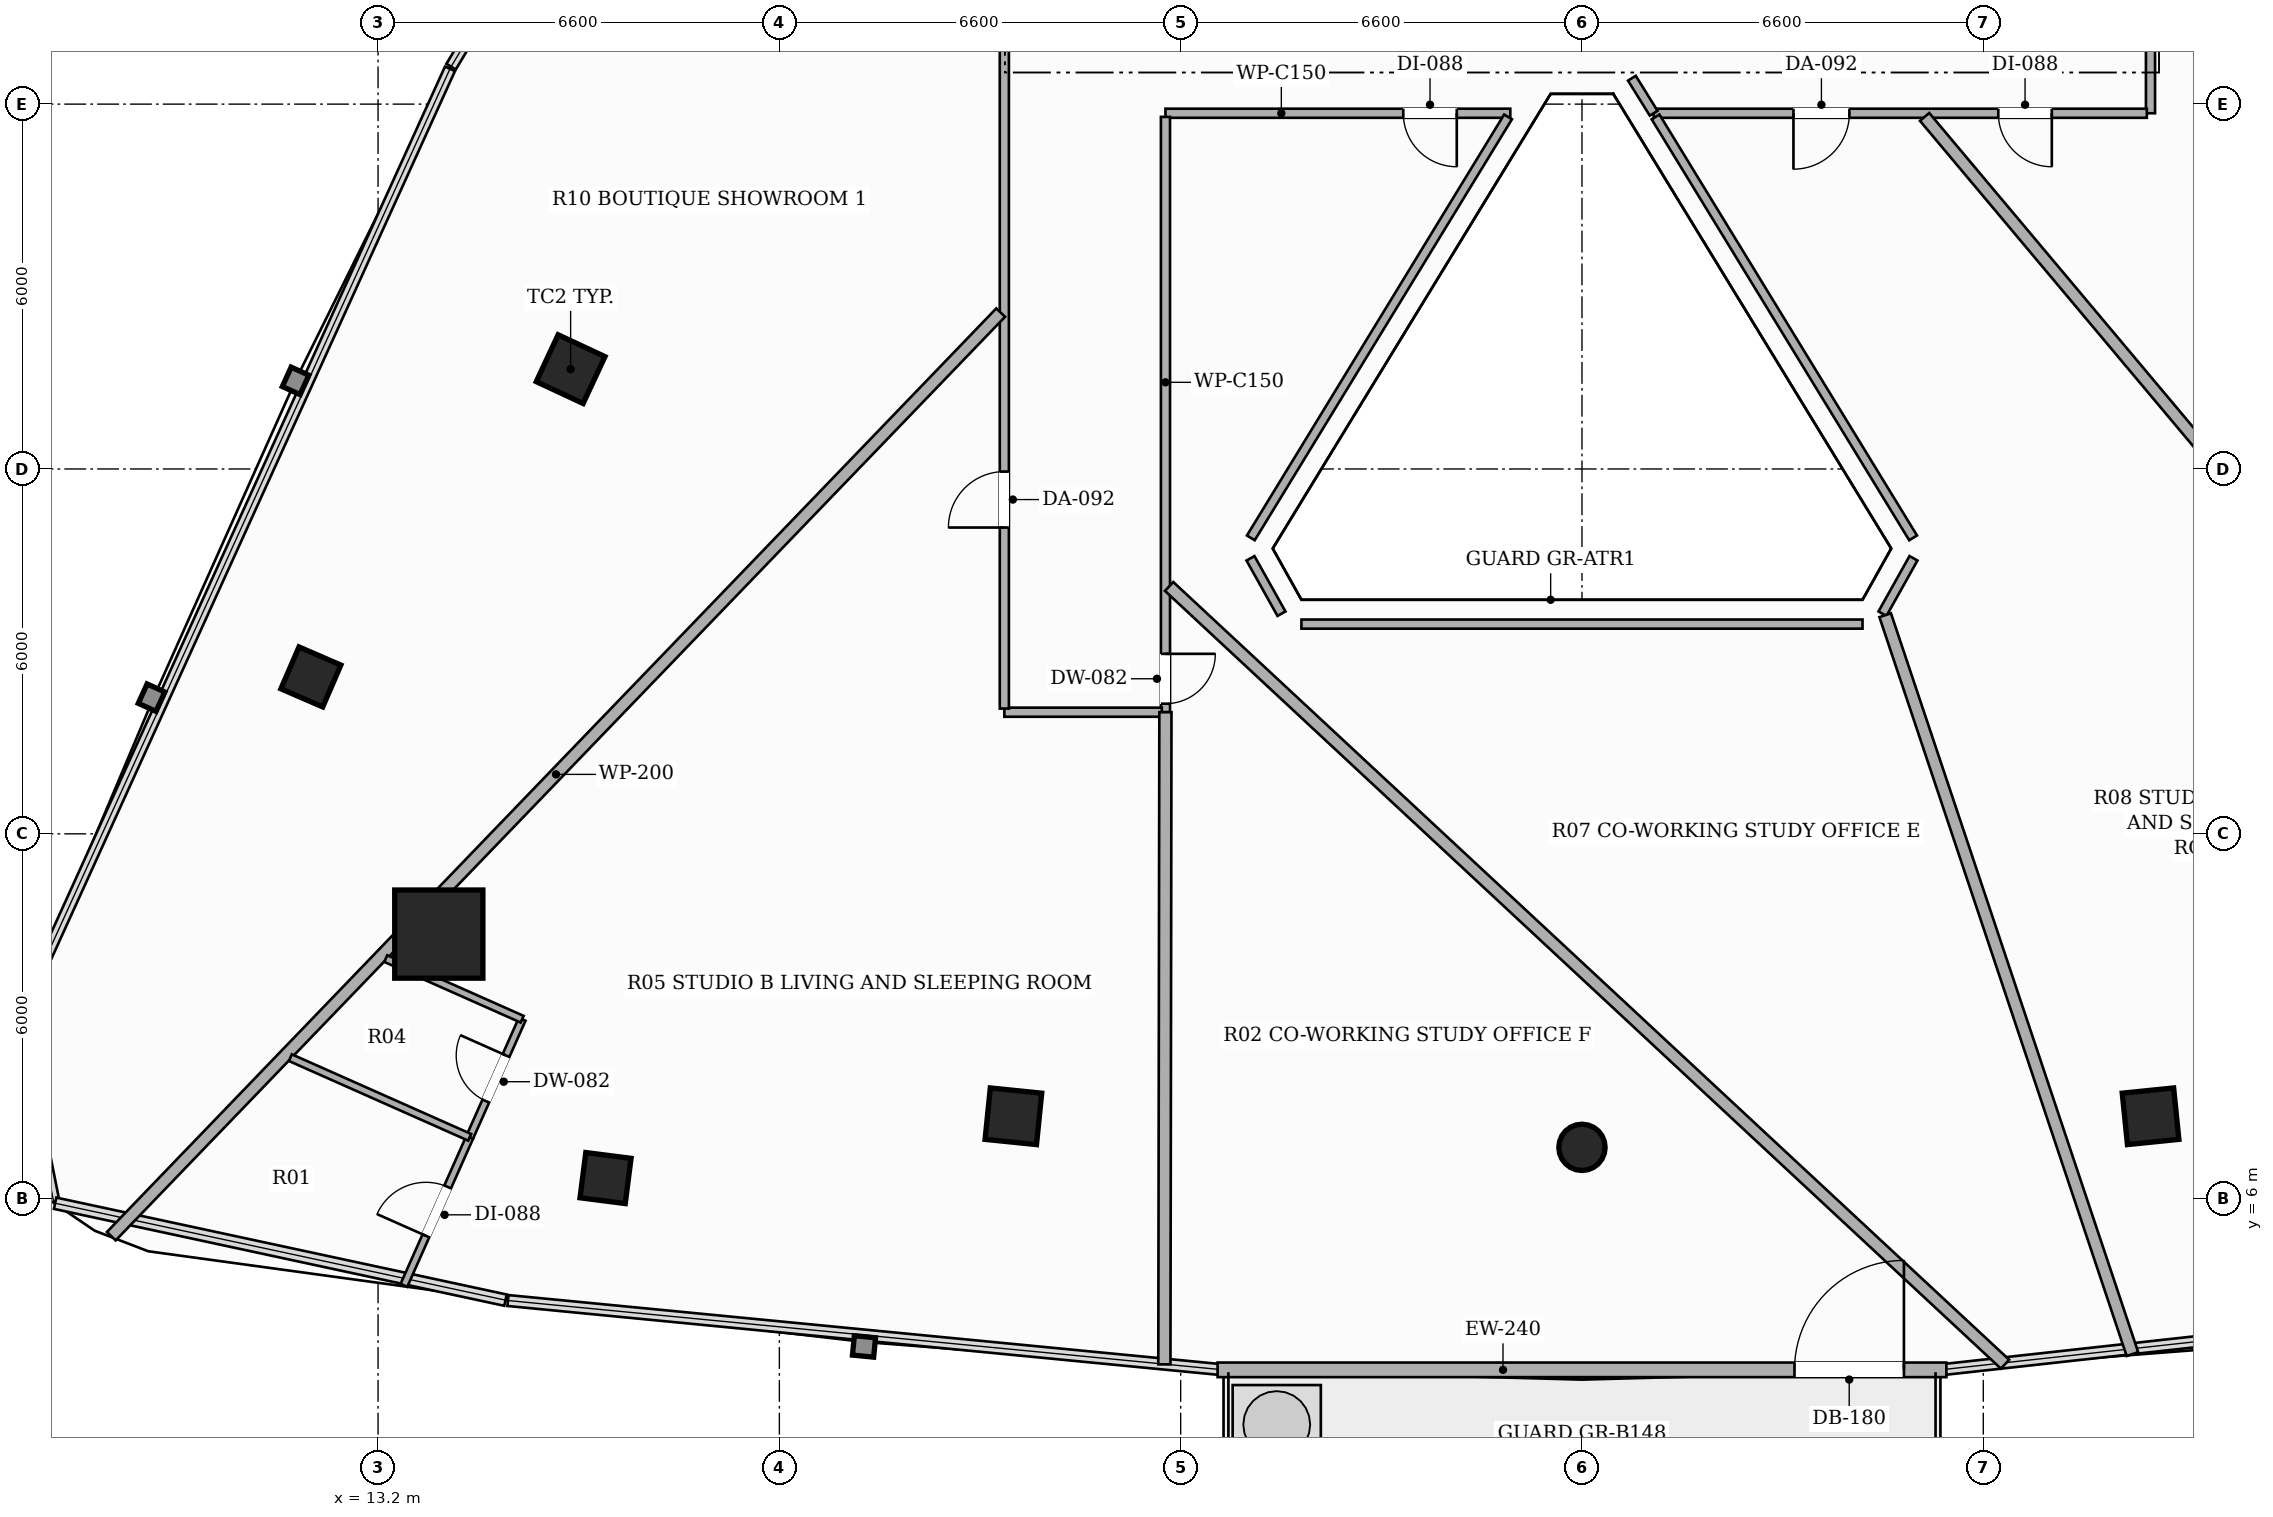
"""IFC4 building model, lengths in metres.
Left out: names, types, materials, properties, quantities, classifications, styles, units other than length and angle.
Written with IfcOpenShell. Run it as: python <this file> out.ifc"""

import sys

from ifc_helpers import new_model, si_unit, direction, frame, frame_2d, origin, origin_2d, place, context, subcontext, project, spatial, rectangle, hollow_rectangle, hollow_circle, extrude, element, fill, save


model = new_model("IFC4")
c1 = context("Model", 3, precision=1e-05, world=origin(), true_north=direction((0.0, 1.0)))
c2 = subcontext(c1, "Body", "Model", "MODEL_VIEW")
j1 = project(units=[si_unit("LENGTHUNIT", "METRE"), si_unit("PLANEANGLEUNIT", "RADIAN")], contexts=[c1])
p1 = place(None, origin())
s1 = spatial("IfcSite", under=j1, at=p1, CompositionType="ELEMENT")
p2 = place(p1, origin())
s2 = spatial("IfcBuilding", under=s1, at=p2, CompositionType="ELEMENT")
p3 = place(p2, frame((0.0, 0.0, 133.1)))
s3 = spatial("IfcBuildingStorey", under=s2, at=p3, CompositionType="ELEMENT", Elevation=133.1)
p4 = place(p3, frame((14.199, 10.351, 0.0), z_axis=(0.0, 0.0, 1.0), x_axis=(1.0, 0.0, 0.0)))
e1 = element("IfcColumn", 1, at=p4, inside=s3, PredefinedType="COLUMN", context=c2, shape_type="SweptSolid", body=[
    extrude(hollow_rectangle(XDim=1.45, YDim=1.45, WallThickness=0.045, at=origin_2d()), origin(), (0.0, 0.0, 1.0), 3.3),
])
for number, where, z_axis, x_axis in (
    (2, (16.367, 19.642, 0.0), (0.0, 0.0, 1.0), (0.423, 0.906, 0.0)),
    (3, (23.649, 7.355, 0.0), (0.0, 0.0, 1.0), (-0.995, 0.101, 0.0)),
):
    element("IfcColumn", number, at=place(p3, frame(where, z_axis=z_axis, x_axis=x_axis)), inside=s3, PredefinedType="COLUMN", context=c2, shape_type="SweptSolid", body=[
        extrude(hollow_rectangle(XDim=0.85, YDim=0.85, WallThickness=0.028, at=origin_2d()), origin(), (0.0, 0.0, 1.0), 3.3),
    ])
p5 = place(p3, frame((33.0, 6.844, 0.0), z_axis=(0.0, 0.0, 1.0), x_axis=(1.0, 0.0, 0.0)))
e4 = element("IfcColumn", 4, at=p5, inside=s3, PredefinedType="COLUMN", context=c2, shape_type="SweptSolid", body=[
    extrude(hollow_circle(Radius=0.381, WallThickness=0.022, at=origin_2d()), origin(), (0.0, 0.0, 1.0), 3.3),
])
p6 = place(p3, frame((42.351, 7.355, 0.0), z_axis=(0.0, 0.0, 1.0), x_axis=(0.994880708829, 0.101056297183, 0.0)))
e5 = element("IfcColumn", 5, at=p6, inside=s3, PredefinedType="COLUMN", context=c2, shape_type="SweptSolid", body=[
    extrude(hollow_rectangle(XDim=0.85, YDim=0.85, WallThickness=0.028, at=origin_2d()), origin(), (0.0, 0.0, 1.0), 3.3),
])
for number, where, z_axis, x_axis in (
    (6, (12.095, 14.58, 0.0), (0.0, 0.0, 1.0), (0.397, 0.918, 0.0)),
    (7, (16.941, 6.339, 0.0), (0.0, 0.0, 1.0), (-0.992, 0.127, 0.0)),
):
    element("IfcColumn", number, at=place(p3, frame(where, z_axis=z_axis, x_axis=x_axis)), inside=s3, PredefinedType="COLUMN", context=c2, shape_type="SweptSolid", body=[
        extrude(hollow_rectangle(XDim=0.75, YDim=0.75, WallThickness=0.025, at=origin_2d()), origin(), (0.0, 0.0, 1.0), 3.3),
    ])
p7 = place(p3, frame((27.007, 3.185, 0.0), z_axis=(0.0, 0.0, 1.0), x_axis=(1.0, 0.0, 0.0)))
e8 = element("IfcWall", 8, at=p7, inside=s3, PredefinedType="SOLIDWALL", context=c2, shape_type="SweptSolid", body=[
    extrude(rectangle(XDim=11.986, YDim=0.24, at=frame_2d((5.993, 0.0))), origin(), (0.0, 0.0, 1.0), 2.624),
])
p8 = place(p7, frame((9.488, 0.0, 0.0)))
e9 = element("IfcOpeningElement", 9, at=p8, cuts=e8, PredefinedType="OPENING", context=c2, shape_type="SweptSolid", body=[
    extrude(rectangle(XDim=1.8, YDim=2.2, at=frame_2d((0.9, 1.1))), frame((0.0, 0.13, 0.0), z_axis=(0.0, -1.0, 0.0), x_axis=(1.0, 0.0, 0.0)), (0.0, 0.0, 1.0), 0.26),
])
p9 = place(p3, frame((31.821, 23.85, 0.0), z_axis=(0.0, 0.0, 1.0), x_axis=(-1.0, 0.0, 0.0)))
e10 = element("IfcWall", 10, at=p9, inside=s3, PredefinedType="PARTITIONING", context=c2, shape_type="SweptSolid", body=[
    extrude(rectangle(XDim=5.671, YDim=0.15, at=frame_2d((2.835, 0.0))), origin(), (0.0, 0.0, 1.0), 2.721),
])
p10 = place(p9, frame((0.88, 0.0, 0.0)))
e11 = element("IfcOpeningElement", 11, at=p10, cuts=e10, PredefinedType="OPENING", context=c2, shape_type="SweptSolid", body=[
    extrude(rectangle(XDim=0.88, YDim=2.1, at=frame_2d((0.44, 1.05))), frame((0.0, 0.085, 0.0), z_axis=(0.0, -1.0, 0.0), x_axis=(1.0, 0.0, 0.0)), (0.0, 0.0, 1.0), 0.17),
])
p11 = place(p3, frame((26.15, 23.79, 0.0), z_axis=(0.0, 0.0, 1.0), x_axis=(0.0, -1.0, 0.0)))
e12 = element("IfcWall", 12, at=p11, inside=s3, PredefinedType="PARTITIONING", context=c2, shape_type="SweptSolid", body=[
    extrude(rectangle(XDim=9.79, YDim=0.15, at=frame_2d((4.895, 0.0))), origin(), (0.0, 0.0, 1.0), 2.721),
])
p12 = place(p11, frame((8.83, 0.0, 0.0)))
e13 = element("IfcOpeningElement", 13, at=p12, cuts=e12, PredefinedType="OPENING", context=c2, shape_type="SweptSolid", body=[
    extrude(rectangle(XDim=0.82, YDim=2.1, at=frame_2d((0.41, 1.05))), frame((0.0, 0.085, 0.0), z_axis=(0.0, -1.0, 0.0), x_axis=(1.0, 0.0, 0.0)), (0.0, 0.0, 1.0), 0.17),
])
p13 = place(p3, frame((26.09, 14.0, 0.0), z_axis=(0.0, 0.0, 1.0), x_axis=(-1.0, 0.0, 0.0)))
e14 = element("IfcWall", 14, at=p13, inside=s3, PredefinedType="PARTITIONING", context=c2, shape_type="SweptSolid", body=[
    extrude(rectangle(XDim=2.59, YDim=0.15, at=frame_2d((1.295, 0.0))), origin(), (0.0, 0.0, 1.0), 2.721),
])
p14 = place(p3, frame((23.5, 14.06, 0.0), z_axis=(0.0, 0.0, 1.0), x_axis=(0.0, 1.0, 0.0)))
e15 = element("IfcWall", 15, at=p14, inside=s3, PredefinedType="PARTITIONING", context=c2, shape_type="SweptSolid", body=[
    extrude(rectangle(XDim=22.84, YDim=0.15, at=frame_2d((11.42, 0.0))), origin(), (0.0, 0.0, 1.0), 2.413),
])
p15 = place(p14, frame((13.045, 0.0, 0.0)))
e16 = element("IfcOpeningElement", 16, at=p15, cuts=e15, PredefinedType="OPENING", context=c2, shape_type="SweptSolid", body=[
    extrude(rectangle(XDim=0.88, YDim=2.1, at=frame_2d((0.44, 1.05))), frame((0.0, 0.085, 0.0), z_axis=(0.0, -1.0, 0.0), x_axis=(1.0, 0.0, 0.0)), (0.0, 0.0, 1.0), 0.17),
])
p16 = place(p14, frame((2.977, 0.0, 0.0)))
e17 = element("IfcOpeningElement", 17, at=p16, cuts=e15, PredefinedType="OPENING", context=c2, shape_type="SweptSolid", body=[
    extrude(rectangle(XDim=0.92, YDim=2.15, at=frame_2d((0.46, 1.075))), frame((0.0, 0.085, 0.0), z_axis=(0.0, -1.0, 0.0), x_axis=(1.0, 0.0, 0.0)), (0.0, 0.0, 1.0), 0.17),
])
p17 = place(p3, frame((42.35, 28.34, 0.0), z_axis=(0.0, 0.0, 1.0), x_axis=(0.0, -1.0, 0.0)))
e18 = element("IfcWall", 18, at=p17, inside=s3, PredefinedType="PARTITIONING", context=c2, shape_type="SweptSolid", body=[
    extrude(rectangle(XDim=4.49, YDim=0.15, at=frame_2d((2.245, 0.0))), origin(), (0.0, 0.0, 1.0), 2.721),
])
p18 = place(p17, frame((1.13, 0.0, 0.0)))
e19 = element("IfcOpeningElement", 19, at=p18, cuts=e18, PredefinedType="OPENING", context=c2, shape_type="SweptSolid", body=[
    extrude(rectangle(XDim=0.88, YDim=2.1, at=frame_2d((0.44, 1.05))), frame((0.0, 0.085, 0.0), z_axis=(0.0, -1.0, 0.0), x_axis=(1.0, 0.0, 0.0)), (0.0, 0.0, 1.0), 0.17),
])
p19 = place(p3, frame((42.29, 23.85, 0.0), z_axis=(0.0, 0.0, 1.0), x_axis=(-1.0, 0.0, 0.0)))
e20 = element("IfcWall", 20, at=p19, inside=s3, PredefinedType="PARTITIONING", context=c2, shape_type="SweptSolid", body=[
    extrude(rectangle(XDim=8.111, YDim=0.15, at=frame_2d((4.056, 0.0))), origin(), (0.0, 0.0, 1.0), 2.492),
])
p20 = place(p19, frame((1.563, 0.0, 0.0)))
e21 = element("IfcOpeningElement", 21, at=p20, cuts=e20, PredefinedType="OPENING", context=c2, shape_type="SweptSolid", body=[
    extrude(rectangle(XDim=0.88, YDim=2.1, at=frame_2d((0.44, 1.05))), frame((0.0, 0.085, 0.0), z_axis=(0.0, -1.0, 0.0), x_axis=(1.0, 0.0, 0.0)), (0.0, 0.0, 1.0), 0.17),
])
p21 = place(p19, frame((4.892, 0.0, 0.0)))
e22 = element("IfcOpeningElement", 22, at=p21, cuts=e20, PredefinedType="OPENING", context=c2, shape_type="SweptSolid", body=[
    extrude(rectangle(XDim=0.92, YDim=2.15, at=frame_2d((0.46, 1.075))), frame((0.0, 0.085, 0.0), z_axis=(0.0, -1.0, 0.0), x_axis=(1.0, 0.0, 0.0)), (0.0, 0.0, 1.0), 0.17),
])
p22 = place(p3, frame((34.179, 23.85, 0.0), z_axis=(0.0, 0.0, 1.0), x_axis=(-0.527828834635, 0.849350764601, 0.0)))
e23 = element("IfcWall", 23, at=p22, inside=s3, PredefinedType="PARTITIONING", context=c2, shape_type="SweptSolid", body=[
    extrude(rectangle(XDim=0.678, YDim=0.15, at=frame_2d((0.339, 0.0))), origin(), (0.0, 0.0, 1.0), 3.06),
])
p23 = place(p3, frame((34.21, 23.79, 0.0), z_axis=(0.0, 0.0, 1.0), x_axis=(0.521925672495, -0.852990968528, 0.0)))
e24 = element("IfcWall", 24, at=p23, inside=s3, PredefinedType="PARTITIONING", context=c2, shape_type="SweptSolid", body=[
    extrude(rectangle(XDim=8.116, YDim=0.15, at=frame_2d((4.058, 0.0))), origin(), (0.0, 0.0, 1.0), 2.721),
])
p24 = place(p3, frame((38.452, 16.531, 0.0), z_axis=(0.0, 0.0, 1.0), x_axis=(-0.488539276118, -0.872541904833, 0.0)))
e25 = element("IfcWall", 25, at=p24, inside=s3, PredefinedType="PARTITIONING", context=c2, shape_type="SweptSolid", body=[
    extrude(rectangle(XDim=1.044, YDim=0.15, at=frame_2d((0.522, 0.0))), origin(), (0.0, 0.0, 1.0), 3.06),
])
p25 = place(p3, frame((37.614, 15.449, 0.0), z_axis=(0.0, 0.0, 1.0), x_axis=(-1.0, 0.0, 0.0)))
e26 = element("IfcWall", 26, at=p25, inside=s3, PredefinedType="PARTITIONING", context=c2, shape_type="SweptSolid", body=[
    extrude(rectangle(XDim=9.228, YDim=0.15, at=frame_2d((4.614, 0.0))), origin(), (0.0, 0.0, 1.0), 2.721),
])
p26 = place(p3, frame((28.058, 15.62, 0.0), z_axis=(0.0, 0.0, 1.0), x_axis=(-0.488539276118, 0.872541904833, 0.0)))
e27 = element("IfcWall", 27, at=p26, inside=s3, PredefinedType="PARTITIONING", context=c2, shape_type="SweptSolid", body=[
    extrude(rectangle(XDim=1.044, YDim=0.15, at=frame_2d((0.522, 0.0))), origin(), (0.0, 0.0, 1.0), 3.06),
])
p27 = place(p3, frame((27.554, 16.867, 0.0), z_axis=(0.0, 0.0, 1.0), x_axis=(0.521378191963, 0.853325717968, 0.0)))
e28 = element("IfcWall", 28, at=p27, inside=s3, PredefinedType="PARTITIONING", context=c2, shape_type="SweptSolid", body=[
    extrude(rectangle(XDim=8.113, YDim=0.15, at=frame_2d((4.057, 0.0))), origin(), (0.0, 0.0, 1.0), 2.721),
])
p28 = place(p3, frame((23.44, 20.572, 0.0), z_axis=(0.0, 0.0, 1.0), x_axis=(-0.693655036552, -0.720307358193, 0.0)))
e29 = element("IfcWall", 29, at=p28, inside=s3, PredefinedType="PARTITIONING", context=c2, shape_type="SweptSolid", body=[
    extrude(rectangle(XDim=21.087, YDim=0.2, at=frame_2d((10.543, 0.0))), origin(), (0.0, 0.0, 1.0), 2.413),
])
p29 = place(p3, frame((54.526, 4.867, 0.0), z_axis=(0.0, 0.0, 1.0), x_axis=(-0.643084567011, 0.765795168222, 0.0)))
e30 = element("IfcWall", 30, at=p29, inside=s3, PredefinedType="PARTITIONING", context=c2, shape_type="SweptSolid", body=[
    extrude(rectangle(XDim=24.71, YDim=0.2, at=frame_2d((12.355, 0.0))), origin(), (0.0, 0.0, 1.0), 2.413),
])
p30 = place(p3, frame((42.41, 25.497, 0.0), z_axis=(0.0, 0.0, 1.0), x_axis=(0.882944726502, -0.46947695358, 0.0)))
e31 = element("IfcWall", 31, at=p30, inside=s3, PredefinedType="PARTITIONING", context=c2, shape_type="SweptSolid", body=[
    extrude(rectangle(XDim=13.426, YDim=0.2, at=frame_2d((6.713, 0.0))), origin(), (0.0, 0.0, 1.0), 2.413),
])
p31 = place(p3, frame((42.053, 3.444, 0.0), z_axis=(0.0, 0.0, 1.0), x_axis=(-0.317325063931, 0.948316826699, 0.0)))
e32 = element("IfcWall", 32, at=p31, inside=s3, PredefinedType="PARTITIONING", context=c2, shape_type="SweptSolid", body=[
    extrude(rectangle(XDim=12.813, YDim=0.2, at=frame_2d((6.406, 0.0))), origin(), (0.0, 0.0, 1.0), 2.413),
])
p32 = place(p3, frame((26.149, 14.0, 0.0), z_axis=(0.0, 0.0, 1.0), x_axis=(-0.001570678691, -0.999998766483, 0.0)))
e33 = element("IfcWall", 33, at=p32, inside=s3, PredefinedType="PARTITIONING", context=c2, shape_type="SweptSolid", body=[
    extrude(rectangle(XDim=10.725, YDim=0.2, at=frame_2d((5.363, 0.0))), origin(), (0.0, 0.0, 1.0), 2.413),
])
p33 = place(p3, frame((39.958, 3.278, 0.0), z_axis=(0.0, 0.0, 1.0), x_axis=(-0.732155976475, 0.681137009795, 0.0)))
e34 = element("IfcWall", 34, at=p33, inside=s3, PredefinedType="PARTITIONING", context=c2, shape_type="SweptSolid", body=[
    extrude(rectangle(XDim=18.778, YDim=0.2, at=frame_2d((9.389, 0.0))), origin(), (0.0, 0.0, 1.0), 2.413),
])
p34 = place(p3, frame((14.707, 7.009, 0.0), z_axis=(0.0, 0.0, 1.0), x_axis=(0.406127806348, 0.913816286193, 0.0)))
e35 = element("IfcWall", 35, at=p34, inside=s3, PredefinedType="PARTITIONING", context=c2, shape_type="SweptSolid", body=[
    extrude(rectangle(XDim=2.125, YDim=0.12, at=frame_2d((1.062, 0.0))), origin(), (0.0, 0.0, 1.0), 2.413),
])
p35 = place(p34, frame((0.653, 0.0, 0.0)))
e36 = element("IfcOpeningElement", 36, at=p35, cuts=e35, PredefinedType="OPENING", context=c2, shape_type="SweptSolid", body=[
    extrude(rectangle(XDim=0.82, YDim=2.1, at=frame_2d((0.41, 1.05))), frame((0.0, 0.07, 0.0), z_axis=(0.0, -1.0, 0.0), x_axis=(1.0, 0.0, 0.0)), (0.0, 0.0, 1.0), 0.14),
])
p36 = place(p3, frame((15.57, 8.951, 0.0), z_axis=(0.0, 0.0, 1.0), x_axis=(-0.91379514288, 0.406175376961, 0.0)))
e37 = element("IfcWall", 37, at=p36, inside=s3, PredefinedType="PARTITIONING", context=c2, shape_type="SweptSolid", body=[
    extrude(rectangle(XDim=2.455, YDim=0.12, at=frame_2d((1.228, 0.0))), origin(), (0.0, 0.0, 1.0), 2.413),
])
p37 = place(p3, frame((13.625, 4.574, 0.0), z_axis=(0.0, 0.0, 1.0), x_axis=(0.406070456553, 0.913841772034, 0.0)))
e38 = element("IfcWall", 38, at=p37, inside=s3, PredefinedType="PARTITIONING", context=c2, shape_type="SweptSolid", body=[
    extrude(rectangle(XDim=2.665, YDim=0.12, at=frame_2d((1.332, 0.0))), origin(), (0.0, 0.0, 1.0), 3.06),
])
p38 = place(p37, frame((0.892, 0.0, 0.0)))
e39 = element("IfcOpeningElement", 39, at=p38, cuts=e38, PredefinedType="OPENING", context=c2, shape_type="SweptSolid", body=[
    extrude(rectangle(XDim=0.88, YDim=2.1, at=frame_2d((0.44, 1.05))), frame((0.0, 0.07, 0.0), z_axis=(0.0, -1.0, 0.0), x_axis=(1.0, 0.0, 0.0)), (0.0, 0.0, 1.0), 0.14),
])
p39 = place(p3, frame((14.707, 7.009, 0.0), z_axis=(0.0, 0.0, 1.0), x_axis=(-0.913880174296, 0.40598402312, 0.0)))
e40 = element("IfcWall", 40, at=p39, inside=s3, PredefinedType="PARTITIONING", context=c2, shape_type="SweptSolid", body=[
    extrude(rectangle(XDim=3.227, YDim=0.12, at=frame_2d((1.613, 0.0))), origin(), (0.0, 0.0, 1.0), 3.06),
])
p40 = place(p8, origin())
e41 = element("IfcDoor", 41, at=p40, inside=s3, OperationType="SINGLE_SWING_RIGHT", PredefinedType="DOOR", context=c2, shape_type="SweptSolid", body=[
    extrude(rectangle(XDim=1.8, YDim=2.2, at=frame_2d((0.9, 1.1))), frame((0.0, 0.025, 0.0), z_axis=(0.0, -1.0, 0.0), x_axis=(1.0, 0.0, 0.0)), (0.0, 0.0, 1.0), 0.05),
])
fill(e9, e41)
p41 = place(p20, origin())
e42 = element("IfcDoor", 42, at=p41, inside=s3, OperationType="SINGLE_SWING_LEFT", PredefinedType="DOOR", context=c2, shape_type="SweptSolid", body=[
    extrude(rectangle(XDim=0.88, YDim=2.1, at=frame_2d((0.44, 1.05))), frame((0.0, 0.025, 0.0), z_axis=(0.0, -1.0, 0.0), x_axis=(1.0, 0.0, 0.0)), (0.0, 0.0, 1.0), 0.05),
])
fill(e21, e42)
p42 = place(p21, origin())
e43 = element("IfcDoor", 43, at=p42, inside=s3, OperationType="SINGLE_SWING_RIGHT", PredefinedType="DOOR", context=c2, shape_type="SweptSolid", body=[
    extrude(rectangle(XDim=0.92, YDim=2.15, at=frame_2d((0.46, 1.075))), frame((0.0, 0.025, 0.0), z_axis=(0.0, -1.0, 0.0), x_axis=(1.0, 0.0, 0.0)), (0.0, 0.0, 1.0), 0.05),
])
fill(e22, e43)
p43 = place(p16, origin())
e44 = element("IfcDoor", 44, at=p43, inside=s3, OperationType="SINGLE_SWING_LEFT", PredefinedType="DOOR", context=c2, shape_type="SweptSolid", body=[
    extrude(rectangle(XDim=0.92, YDim=2.15, at=frame_2d((0.46, 1.075))), frame((0.0, 0.025, 0.0), z_axis=(0.0, -1.0, 0.0), x_axis=(1.0, 0.0, 0.0)), (0.0, 0.0, 1.0), 0.05),
])
fill(e17, e44)
p44 = place(p35, origin())
e45 = element("IfcDoor", 45, at=p44, inside=s3, OperationType="SINGLE_SWING_RIGHT", PredefinedType="DOOR", context=c2, shape_type="SweptSolid", body=[
    extrude(rectangle(XDim=0.82, YDim=2.1, at=frame_2d((0.41, 1.05))), frame((0.0, 0.025, 0.0), z_axis=(0.0, -1.0, 0.0), x_axis=(1.0, 0.0, 0.0)), (0.0, 0.0, 1.0), 0.05),
])
fill(e36, e45)
p45 = place(p38, origin())
e46 = element("IfcDoor", 46, at=p45, inside=s3, OperationType="SINGLE_SWING_LEFT", PredefinedType="DOOR", context=c2, shape_type="SweptSolid", body=[
    extrude(rectangle(XDim=0.88, YDim=2.1, at=frame_2d((0.44, 1.05))), frame((0.0, 0.025, 0.0), z_axis=(0.0, -1.0, 0.0), x_axis=(1.0, 0.0, 0.0)), (0.0, 0.0, 1.0), 0.05),
])
fill(e39, e46)
p46 = place(p10, origin())
e47 = element("IfcDoor", 47, at=p46, inside=s3, OperationType="SINGLE_SWING_LEFT", PredefinedType="DOOR", context=c2, shape_type="SweptSolid", body=[
    extrude(rectangle(XDim=0.88, YDim=2.1, at=frame_2d((0.44, 1.05))), frame((0.0, 0.025, 0.0), z_axis=(0.0, -1.0, 0.0), x_axis=(1.0, 0.0, 0.0)), (0.0, 0.0, 1.0), 0.05),
])
fill(e11, e47)
p47 = place(p12, origin())
e48 = element("IfcDoor", 48, at=p47, inside=s3, OperationType="SINGLE_SWING_LEFT", PredefinedType="DOOR", context=c2, shape_type="SweptSolid", body=[
    extrude(rectangle(XDim=0.82, YDim=2.1, at=frame_2d((0.41, 1.05))), frame((0.0, 0.025, 0.0), z_axis=(0.0, -1.0, 0.0), x_axis=(1.0, 0.0, 0.0)), (0.0, 0.0, 1.0), 0.05),
])
fill(e13, e48)
save(model, sys.argv[1])
